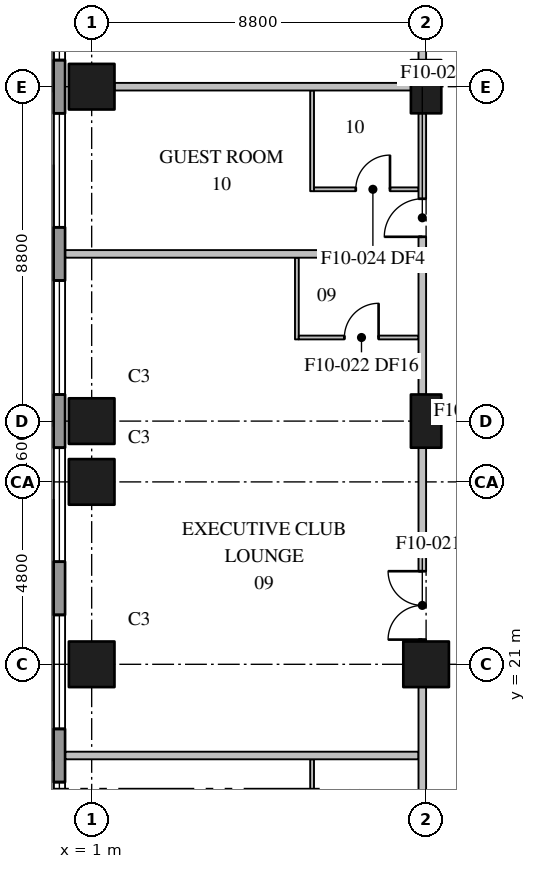
"""IFC4 building model, lengths in metres.
Left out: names, types, materials, properties, quantities, classifications, styles, units other than length and angle.
Written with IfcOpenShell. Run it as: python <this file> out.ifc"""

import sys

from ifc_helpers import new_model, si_unit, direction, frame, frame_2d, origin, origin_2d, place, context, subcontext, project, spatial, rectangle, extrude, element, fill, save


model = new_model("IFC4")
c1 = context("Model", 3, precision=1e-05, world=origin(), true_north=direction((0.0, 1.0)))
c2 = subcontext(c1, "Body", "Model", "MODEL_VIEW")
j1 = project(units=[si_unit("LENGTHUNIT", "METRE"), si_unit("PLANEANGLEUNIT", "RADIAN")], contexts=[c1])
p1 = place(None, origin())
s1 = spatial("IfcSite", under=j1, at=p1, CompositionType="ELEMENT")
p2 = place(p1, origin())
s2 = spatial("IfcBuilding", under=s1, at=p2, CompositionType="ELEMENT")
p3 = place(p2, frame((0.0, 0.0, 101.9)))
s3 = spatial("IfcBuildingStorey", under=s2, at=p3, CompositionType="ELEMENT", Elevation=101.9)
for number, where, z_axis, x_axis in (
    (1, (1.0, 21.0, 0.0), (0.0, 0.0, 1.0), (1.0, 0.0, 0.0)),
    (2, (1.0, 25.8, 0.0), (0.0, 0.0, 1.0), (1.0, 0.0, 0.0)),
    (3, (1.0, 27.4, 0.0), (0.0, 0.0, 1.0), (1.0, 0.0, 0.0)),
    (4, (1.0, 36.2, 0.0), (0.0, 0.0, 1.0), (1.0, 0.0, 0.0)),
    (5, (9.8, 21.0, 0.0), (0.0, 0.0, 1.0), (1.0, 0.0, 0.0)),
):
    element("IfcColumn", number, at=place(p3, frame(where, z_axis=z_axis, x_axis=x_axis)), inside=s3, PredefinedType="COLUMN", context=c2, shape_type="SweptSolid", body=[
        extrude(rectangle(XDim=1.2, YDim=1.2, at=origin_2d()), origin(), (0.0, 0.0, 1.0), 5.5),
    ])
for number, where, z_axis, x_axis in (
    (6, (9.8, 27.4, 0.0), (0.0, 0.0, 1.0), (0.0, 1.0, 0.0)),
    (7, (9.8, 36.2, 0.0), (0.0, 0.0, 1.0), (0.0, 1.0, 0.0)),
):
    element("IfcColumn", number, at=place(p3, frame(where, z_axis=z_axis, x_axis=x_axis)), inside=s3, PredefinedType="COLUMN", context=c2, shape_type="SweptSolid", body=[
        extrude(rectangle(XDim=1.4, YDim=0.8, at=origin_2d()), origin(), (0.0, 0.0, 1.0), 5.5),
    ])
p4 = place(p3, frame((0.15, 78.7, 0.0), z_axis=(0.0, 0.0, 1.0), x_axis=(0.0, -1.0, 0.0)))
e8 = element("IfcWall", 8, at=p4, inside=s3, PredefinedType="STANDARD", context=c2, shape_type="SweptSolid", body=[
    extrude(rectangle(XDim=76.5, YDim=0.3, at=frame_2d((38.25, 0.0))), origin(), (0.0, 0.0, 1.0), 5.2),
])
p5 = place(p4, frame((3.6, 0.0, 0.75)))
e9 = element("IfcOpeningElement", 9, at=p5, cuts=e8, PredefinedType="OPENING", context=c2, shape_type="SweptSolid", body=[
    extrude(rectangle(XDim=3.0, YDim=2.3, at=frame_2d((1.5, 1.15))), frame((0.0, 0.16, 0.0), z_axis=(0.0, -1.0, 0.0), x_axis=(1.0, 0.0, 0.0)), (0.0, 0.0, 1.0), 0.32),
])
p6 = place(p4, frame((8.0, 0.0, 0.75)))
e10 = element("IfcOpeningElement", 10, at=p6, cuts=e8, PredefinedType="OPENING", context=c2, shape_type="SweptSolid", body=[
    extrude(rectangle(XDim=3.0, YDim=2.3, at=frame_2d((1.5, 1.15))), frame((0.0, 0.16, 0.0), z_axis=(0.0, -1.0, 0.0), x_axis=(1.0, 0.0, 0.0)), (0.0, 0.0, 1.0), 0.32),
])
p7 = place(p4, frame((12.4, 0.0, 0.75)))
e11 = element("IfcOpeningElement", 11, at=p7, cuts=e8, PredefinedType="OPENING", context=c2, shape_type="SweptSolid", body=[
    extrude(rectangle(XDim=3.0, YDim=2.3, at=frame_2d((1.5, 1.15))), frame((0.0, 0.16, 0.0), z_axis=(0.0, -1.0, 0.0), x_axis=(1.0, 0.0, 0.0)), (0.0, 0.0, 1.0), 0.32),
])
p8 = place(p4, frame((16.8, 0.0, 0.75)))
e12 = element("IfcOpeningElement", 12, at=p8, cuts=e8, PredefinedType="OPENING", context=c2, shape_type="SweptSolid", body=[
    extrude(rectangle(XDim=3.0, YDim=2.3, at=frame_2d((1.5, 1.15))), frame((0.0, 0.16, 0.0), z_axis=(0.0, -1.0, 0.0), x_axis=(1.0, 0.0, 0.0)), (0.0, 0.0, 1.0), 0.32),
])
p9 = place(p4, frame((21.2, 0.0, 0.75)))
e13 = element("IfcOpeningElement", 13, at=p9, cuts=e8, PredefinedType="OPENING", context=c2, shape_type="SweptSolid", body=[
    extrude(rectangle(XDim=3.0, YDim=2.3, at=frame_2d((1.5, 1.15))), frame((0.0, 0.16, 0.0), z_axis=(0.0, -1.0, 0.0), x_axis=(1.0, 0.0, 0.0)), (0.0, 0.0, 1.0), 0.32),
])
p10 = place(p4, frame((25.6, 0.0, 0.75)))
e14 = element("IfcOpeningElement", 14, at=p10, cuts=e8, PredefinedType="OPENING", context=c2, shape_type="SweptSolid", body=[
    extrude(rectangle(XDim=3.0, YDim=2.3, at=frame_2d((1.5, 1.15))), frame((0.0, 0.16, 0.0), z_axis=(0.0, -1.0, 0.0), x_axis=(1.0, 0.0, 0.0)), (0.0, 0.0, 1.0), 0.32),
])
p11 = place(p4, frame((30.0, 0.0, 0.75)))
e15 = element("IfcOpeningElement", 15, at=p11, cuts=e8, PredefinedType="OPENING", context=c2, shape_type="SweptSolid", body=[
    extrude(rectangle(XDim=3.0, YDim=2.3, at=frame_2d((1.5, 1.15))), frame((0.0, 0.16, 0.0), z_axis=(0.0, -1.0, 0.0), x_axis=(1.0, 0.0, 0.0)), (0.0, 0.0, 1.0), 0.32),
])
p12 = place(p4, frame((34.4, 0.0, 0.75)))
e16 = element("IfcOpeningElement", 16, at=p12, cuts=e8, PredefinedType="OPENING", context=c2, shape_type="SweptSolid", body=[
    extrude(rectangle(XDim=3.0, YDim=2.3, at=frame_2d((1.5, 1.15))), frame((0.0, 0.16, 0.0), z_axis=(0.0, -1.0, 0.0), x_axis=(1.0, 0.0, 0.0)), (0.0, 0.0, 1.0), 0.32),
])
p13 = place(p4, frame((38.8, 0.0, 0.75)))
e17 = element("IfcOpeningElement", 17, at=p13, cuts=e8, PredefinedType="OPENING", context=c2, shape_type="SweptSolid", body=[
    extrude(rectangle(XDim=3.0, YDim=2.3, at=frame_2d((1.5, 1.15))), frame((0.0, 0.16, 0.0), z_axis=(0.0, -1.0, 0.0), x_axis=(1.0, 0.0, 0.0)), (0.0, 0.0, 1.0), 0.32),
])
p14 = place(p4, frame((43.2, 0.0, 0.75)))
e18 = element("IfcOpeningElement", 18, at=p14, cuts=e8, PredefinedType="OPENING", context=c2, shape_type="SweptSolid", body=[
    extrude(rectangle(XDim=3.0, YDim=2.3, at=frame_2d((1.5, 1.15))), frame((0.0, 0.16, 0.0), z_axis=(0.0, -1.0, 0.0), x_axis=(1.0, 0.0, 0.0)), (0.0, 0.0, 1.0), 0.32),
])
p15 = place(p4, frame((47.6, 0.0, 0.75)))
e19 = element("IfcOpeningElement", 19, at=p15, cuts=e8, PredefinedType="OPENING", context=c2, shape_type="SweptSolid", body=[
    extrude(rectangle(XDim=3.0, YDim=2.3, at=frame_2d((1.5, 1.15))), frame((0.0, 0.16, 0.0), z_axis=(0.0, -1.0, 0.0), x_axis=(1.0, 0.0, 0.0)), (0.0, 0.0, 1.0), 0.32),
])
p16 = place(p4, frame((52.0, 0.0, 0.75)))
e20 = element("IfcOpeningElement", 20, at=p16, cuts=e8, PredefinedType="OPENING", context=c2, shape_type="SweptSolid", body=[
    extrude(rectangle(XDim=3.0, YDim=2.3, at=frame_2d((1.5, 1.15))), frame((0.0, 0.16, 0.0), z_axis=(0.0, -1.0, 0.0), x_axis=(1.0, 0.0, 0.0)), (0.0, 0.0, 1.0), 0.32),
])
p17 = place(p4, frame((56.4, 0.0, 0.75)))
e21 = element("IfcOpeningElement", 21, at=p17, cuts=e8, PredefinedType="OPENING", context=c2, shape_type="SweptSolid", body=[
    extrude(rectangle(XDim=3.0, YDim=2.3, at=frame_2d((1.5, 1.15))), frame((0.0, 0.16, 0.0), z_axis=(0.0, -1.0, 0.0), x_axis=(1.0, 0.0, 0.0)), (0.0, 0.0, 1.0), 0.32),
])
p18 = place(p4, frame((60.8, 0.0, 0.75)))
e22 = element("IfcOpeningElement", 22, at=p18, cuts=e8, PredefinedType="OPENING", context=c2, shape_type="SweptSolid", body=[
    extrude(rectangle(XDim=3.0, YDim=2.3, at=frame_2d((1.5, 1.15))), frame((0.0, 0.16, 0.0), z_axis=(0.0, -1.0, 0.0), x_axis=(1.0, 0.0, 0.0)), (0.0, 0.0, 1.0), 0.32),
])
p19 = place(p4, frame((65.2, 0.0, 0.75)))
e23 = element("IfcOpeningElement", 23, at=p19, cuts=e8, PredefinedType="OPENING", context=c2, shape_type="SweptSolid", body=[
    extrude(rectangle(XDim=3.0, YDim=2.3, at=frame_2d((1.5, 1.15))), frame((0.0, 0.16, 0.0), z_axis=(0.0, -1.0, 0.0), x_axis=(1.0, 0.0, 0.0)), (0.0, 0.0, 1.0), 0.32),
])
p20 = place(p4, frame((69.6, 0.0, 0.75)))
e24 = element("IfcOpeningElement", 24, at=p20, cuts=e8, PredefinedType="OPENING", context=c2, shape_type="SweptSolid", body=[
    extrude(rectangle(XDim=3.0, YDim=2.3, at=frame_2d((1.5, 1.15))), frame((0.0, 0.16, 0.0), z_axis=(0.0, -1.0, 0.0), x_axis=(1.0, 0.0, 0.0)), (0.0, 0.0, 1.0), 0.32),
])
p21 = place(p3, frame((9.7, 12.9, 0.0), z_axis=(0.0, 0.0, 1.0), x_axis=(0.0, 1.0, 0.0)))
e25 = element("IfcWall", 25, at=p21, inside=s3, PredefinedType="PARTITIONING", context=c2, shape_type="SweptSolid", body=[
    extrude(rectangle(XDim=7.5, YDim=0.2, at=frame_2d((3.75, 0.0))), origin(), (0.0, 0.0, 1.0), 5.2),
])
p22 = place(p21, frame((1.75, 0.0, 0.0)))
e26 = element("IfcOpeningElement", 26, at=p22, cuts=e25, PredefinedType="OPENING", context=c2, shape_type="SweptSolid", body=[
    extrude(rectangle(XDim=1.0, YDim=2.1, at=frame_2d((0.5, 1.05))), frame((0.0, 0.11, 0.0), z_axis=(0.0, -1.0, 0.0), x_axis=(1.0, 0.0, 0.0)), (0.0, 0.0, 1.0), 0.22),
])
p23 = place(p3, frame((9.7, 21.6, 0.0), z_axis=(0.0, 0.0, 1.0), x_axis=(0.0, 1.0, 0.0)))
e27 = element("IfcWall", 27, at=p23, inside=s3, PredefinedType="PARTITIONING", context=c2, shape_type="SweptSolid", body=[
    extrude(rectangle(XDim=5.1, YDim=0.2, at=frame_2d((2.55, 0.0))), origin(), (0.0, 0.0, 1.0), 5.2),
])
p24 = place(p23, frame((0.05, 0.0, 0.0)))
e28 = element("IfcOpeningElement", 28, at=p24, cuts=e27, PredefinedType="OPENING", context=c2, shape_type="SweptSolid", body=[
    extrude(rectangle(XDim=1.8, YDim=2.1, at=frame_2d((0.9, 1.05))), frame((0.0, 0.11, 0.0), z_axis=(0.0, -1.0, 0.0), x_axis=(1.0, 0.0, 0.0)), (0.0, 0.0, 1.0), 0.22),
])
p25 = place(p3, frame((9.7, 28.1, 0.0), z_axis=(0.0, 0.0, 1.0), x_axis=(0.0, 1.0, 0.0)))
e29 = element("IfcWall", 29, at=p25, inside=s3, PredefinedType="PARTITIONING", context=c2, shape_type="SweptSolid", body=[
    extrude(rectangle(XDim=7.4, YDim=0.2, at=frame_2d((3.7, 0.0))), origin(), (0.0, 0.0, 1.0), 5.2),
])
p26 = place(p25, frame((4.15, 0.0, 0.0)))
e30 = element("IfcOpeningElement", 30, at=p26, cuts=e29, PredefinedType="OPENING", context=c2, shape_type="SweptSolid", body=[
    extrude(rectangle(XDim=1.0, YDim=2.1, at=frame_2d((0.5, 1.05))), frame((0.0, 0.11, 0.0), z_axis=(0.0, -1.0, 0.0), x_axis=(1.0, 0.0, 0.0)), (0.0, 0.0, 1.0), 0.22),
])
p27 = place(p3, frame((9.7, 36.9, 0.0), z_axis=(0.0, 0.0, 1.0), x_axis=(0.0, 1.0, 0.0)))
e31 = element("IfcWall", 31, at=p27, inside=s3, PredefinedType="PARTITIONING", context=c2, shape_type="SweptSolid", body=[
    extrude(rectangle(XDim=7.4, YDim=0.2, at=frame_2d((3.7, 0.0))), origin(), (0.0, 0.0, 1.0), 5.2),
])
p28 = place(p27, frame((0.6, 0.0, 0.0)))
e32 = element("IfcOpeningElement", 32, at=p28, cuts=e31, PredefinedType="OPENING", context=c2, shape_type="SweptSolid", body=[
    extrude(rectangle(XDim=1.8, YDim=2.1, at=frame_2d((0.9, 1.05))), frame((0.0, 0.11, 0.0), z_axis=(0.0, -1.0, 0.0), x_axis=(1.0, 0.0, 0.0)), (0.0, 0.0, 1.0), 0.22),
])
for number, where, z_axis, x_axis in (
    (33, (0.31, 18.6, 0.0), (0.0, 0.0, 1.0), (1.0, 0.0, 0.0)),
    (34, (0.31, 31.8, 0.0), (0.0, 0.0, 1.0), (1.0, 0.0, 0.0)),
):
    element("IfcWall", number, at=place(p3, frame(where, z_axis=z_axis, x_axis=x_axis)), inside=s3, PredefinedType="PARTITIONING", context=c2, shape_type="SweptSolid", body=[
        extrude(rectangle(XDim=9.29, YDim=0.2, at=frame_2d((4.645, 0.0))), origin(), (0.0, 0.0, 1.0), 5.2),
    ])
p29 = place(p3, frame((1.6, 36.2, 0.0), z_axis=(0.0, 0.0, 1.0), x_axis=(1.0, 0.0, 0.0)))
e35 = element("IfcWall", 35, at=p29, inside=s3, PredefinedType="PARTITIONING", context=c2, shape_type="SweptSolid", body=[
    extrude(rectangle(XDim=7.8, YDim=0.2, at=frame_2d((3.9, 0.0))), origin(), (0.0, 0.0, 1.0), 5.2),
])
p30 = place(p3, frame((6.8, 15.85, 0.0), z_axis=(0.0, 0.0, 1.0), x_axis=(0.0, 1.0, 0.0)))
e36 = element("IfcWall", 36, at=p30, inside=s3, PredefinedType="PARTITIONING", context=c2, shape_type="SweptSolid", body=[
    extrude(rectangle(XDim=2.65, YDim=0.1, at=frame_2d((1.325, 0.0))), origin(), (0.0, 0.0, 1.0), 5.2),
])
p31 = place(p3, frame((6.8, 33.45, 0.0), z_axis=(0.0, 0.0, 1.0), x_axis=(0.0, 1.0, 0.0)))
e37 = element("IfcWall", 37, at=p31, inside=s3, PredefinedType="PARTITIONING", context=c2, shape_type="SweptSolid", body=[
    extrude(rectangle(XDim=2.65, YDim=0.1, at=frame_2d((1.325, 0.0))), origin(), (0.0, 0.0, 1.0), 5.2),
])
p32 = place(p3, frame((6.4, 29.55, 0.0), z_axis=(0.0, 0.0, 1.0), x_axis=(0.0, 1.0, 0.0)))
e38 = element("IfcWall", 38, at=p32, inside=s3, PredefinedType="PARTITIONING", context=c2, shape_type="SweptSolid", body=[
    extrude(rectangle(XDim=2.15, YDim=0.1, at=frame_2d((1.075, 0.0))), origin(), (0.0, 0.0, 1.0), 5.2),
])
p33 = place(p3, frame((6.45, 29.6, 0.0), z_axis=(0.0, 0.0, 1.0), x_axis=(1.0, 0.0, 0.0)))
e39 = element("IfcWall", 39, at=p33, inside=s3, PredefinedType="PARTITIONING", context=c2, shape_type="SweptSolid", body=[
    extrude(rectangle(XDim=3.15, YDim=0.1, at=frame_2d((1.575, 0.0))), origin(), (0.0, 0.0, 1.0), 5.2),
])
p34 = place(p33, frame((1.2, 0.0, 0.0)))
e40 = element("IfcOpeningElement", 40, at=p34, cuts=e39, PredefinedType="OPENING", context=c2, shape_type="SweptSolid", body=[
    extrude(rectangle(XDim=0.9, YDim=2.1, at=frame_2d((0.45, 1.05))), frame((0.0, 0.06, 0.0), z_axis=(0.0, -1.0, 0.0), x_axis=(1.0, 0.0, 0.0)), (0.0, 0.0, 1.0), 0.12),
])
p35 = place(p3, frame((6.85, 33.5, 0.0), z_axis=(0.0, 0.0, 1.0), x_axis=(1.0, 0.0, 0.0)))
e41 = element("IfcWall", 41, at=p35, inside=s3, PredefinedType="PARTITIONING", context=c2, shape_type="SweptSolid", body=[
    extrude(rectangle(XDim=2.75, YDim=0.1, at=frame_2d((1.375, 0.0))), origin(), (0.0, 0.0, 1.0), 5.2),
])
p36 = place(p35, frame((1.1, 0.0, 0.0)))
e42 = element("IfcOpeningElement", 42, at=p36, cuts=e41, PredefinedType="OPENING", context=c2, shape_type="SweptSolid", body=[
    extrude(rectangle(XDim=0.9, YDim=2.1, at=frame_2d((0.45, 1.05))), frame((0.0, 0.06, 0.0), z_axis=(0.0, -1.0, 0.0), x_axis=(1.0, 0.0, 0.0)), (0.0, 0.0, 1.0), 0.12),
])
p37 = place(p13, origin())
e43 = element("IfcWindow", 43, at=p37, inside=s3, PartitioningType="SINGLE_PANEL", PredefinedType="WINDOW", context=c2, shape_type="SweptSolid", body=[
    extrude(rectangle(XDim=3.0, YDim=2.3, at=frame_2d((1.5, 1.15))), frame((0.0, 0.03, 0.0), z_axis=(0.0, -1.0, 0.0), x_axis=(1.0, 0.0, 0.0)), (0.0, 0.0, 1.0), 0.06),
])
fill(e17, e43)
p38 = place(p14, origin())
e44 = element("IfcWindow", 44, at=p38, inside=s3, PartitioningType="SINGLE_PANEL", PredefinedType="WINDOW", context=c2, shape_type="SweptSolid", body=[
    extrude(rectangle(XDim=3.0, YDim=2.3, at=frame_2d((1.5, 1.15))), frame((0.0, 0.03, 0.0), z_axis=(0.0, -1.0, 0.0), x_axis=(1.0, 0.0, 0.0)), (0.0, 0.0, 1.0), 0.06),
])
fill(e18, e44)
p39 = place(p15, origin())
e45 = element("IfcWindow", 45, at=p39, inside=s3, PartitioningType="SINGLE_PANEL", PredefinedType="WINDOW", context=c2, shape_type="SweptSolid", body=[
    extrude(rectangle(XDim=3.0, YDim=2.3, at=frame_2d((1.5, 1.15))), frame((0.0, 0.03, 0.0), z_axis=(0.0, -1.0, 0.0), x_axis=(1.0, 0.0, 0.0)), (0.0, 0.0, 1.0), 0.06),
])
fill(e19, e45)
p40 = place(p16, origin())
e46 = element("IfcWindow", 46, at=p40, inside=s3, PartitioningType="SINGLE_PANEL", PredefinedType="WINDOW", context=c2, shape_type="SweptSolid", body=[
    extrude(rectangle(XDim=3.0, YDim=2.3, at=frame_2d((1.5, 1.15))), frame((0.0, 0.03, 0.0), z_axis=(0.0, -1.0, 0.0), x_axis=(1.0, 0.0, 0.0)), (0.0, 0.0, 1.0), 0.06),
])
fill(e20, e46)
p41 = place(p17, origin())
e47 = element("IfcWindow", 47, at=p41, inside=s3, PartitioningType="SINGLE_PANEL", PredefinedType="WINDOW", context=c2, shape_type="SweptSolid", body=[
    extrude(rectangle(XDim=3.0, YDim=2.3, at=frame_2d((1.5, 1.15))), frame((0.0, 0.03, 0.0), z_axis=(0.0, -1.0, 0.0), x_axis=(1.0, 0.0, 0.0)), (0.0, 0.0, 1.0), 0.06),
])
fill(e21, e47)
p42 = place(p18, origin())
e48 = element("IfcWindow", 48, at=p42, inside=s3, PartitioningType="SINGLE_PANEL", PredefinedType="WINDOW", context=c2, shape_type="SweptSolid", body=[
    extrude(rectangle(XDim=3.0, YDim=2.3, at=frame_2d((1.5, 1.15))), frame((0.0, 0.03, 0.0), z_axis=(0.0, -1.0, 0.0), x_axis=(1.0, 0.0, 0.0)), (0.0, 0.0, 1.0), 0.06),
])
fill(e22, e48)
p43 = place(p24, origin())
e49 = element("IfcDoor", 49, at=p43, inside=s3, OperationType="DOUBLE_DOOR_SINGLE_SWING", PredefinedType="DOOR", context=c2, shape_type="SweptSolid", body=[
    extrude(rectangle(XDim=1.8, YDim=2.1, at=frame_2d((0.9, 1.05))), frame((0.0, 0.025, 0.0), z_axis=(0.0, -1.0, 0.0), x_axis=(1.0, 0.0, 0.0)), (0.0, 0.0, 1.0), 0.05),
])
fill(e28, e49)
p44 = place(p34, origin())
e50 = element("IfcDoor", 50, at=p44, inside=s3, OperationType="SINGLE_SWING_RIGHT", PredefinedType="DOOR", context=c2, shape_type="SweptSolid", body=[
    extrude(rectangle(XDim=0.9, YDim=2.1, at=frame_2d((0.45, 1.05))), frame((0.0, 0.025, 0.0), z_axis=(0.0, -1.0, 0.0), x_axis=(1.0, 0.0, 0.0)), (0.0, 0.0, 1.0), 0.05),
])
fill(e40, e50)
p45 = place(p26, origin())
e51 = element("IfcDoor", 51, at=p45, inside=s3, OperationType="SINGLE_SWING_LEFT", PredefinedType="DOOR", context=c2, shape_type="SweptSolid", body=[
    extrude(rectangle(XDim=1.0, YDim=2.1, at=frame_2d((0.5, 1.05))), frame((0.0, 0.025, 0.0), z_axis=(0.0, -1.0, 0.0), x_axis=(1.0, 0.0, 0.0)), (0.0, 0.0, 1.0), 0.05),
])
fill(e30, e51)
p46 = place(p36, origin())
e52 = element("IfcDoor", 52, at=p46, inside=s3, OperationType="SINGLE_SWING_RIGHT", PredefinedType="DOOR", context=c2, shape_type="SweptSolid", body=[
    extrude(rectangle(XDim=0.9, YDim=2.1, at=frame_2d((0.45, 1.05))), frame((0.0, 0.025, 0.0), z_axis=(0.0, -1.0, 0.0), x_axis=(1.0, 0.0, 0.0)), (0.0, 0.0, 1.0), 0.05),
])
fill(e42, e52)
save(model, sys.argv[1])
